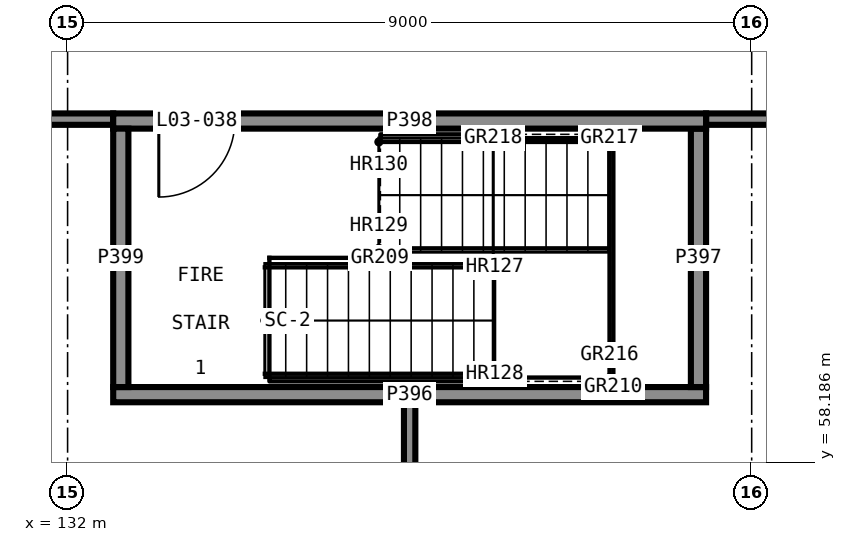
"""IFC4 building model, lengths in metres.
Left out: names, types, materials, properties, quantities, classifications, styles, units other than length and angle.
Written with IfcOpenShell. Run it as: python <this file> out.ifc"""

import sys

from ifc_helpers import new_model, si_unit, direction, frame, frame_2d, origin, place, context, subcontext, project, spatial, rectangle, extrude, element, fill, save


model = new_model("IFC4")
c1 = context("Model", 3, precision=1e-05, world=origin(), true_north=direction((0.0, 1.0)))
c2 = subcontext(c1, "Body", "Model", "MODEL_VIEW")
j1 = project(units=[si_unit("LENGTHUNIT", "METRE"), si_unit("PLANEANGLEUNIT", "RADIAN")], contexts=[c1])
p1 = place(None, origin())
s1 = spatial("IfcSite", under=j1, at=p1, CompositionType="ELEMENT")
p2 = place(p1, origin())
s2 = spatial("IfcBuilding", under=s1, at=p2, CompositionType="ELEMENT")
p3 = place(p2, frame((0.0, 0.0, 13.5)))
s3 = spatial("IfcBuildingStorey", under=s2, at=p3, CompositionType="ELEMENT", Elevation=13.5)
p4 = place(p3, frame((132.6, 59.075, 0.0), z_axis=(0.0, 0.0, 1.0), x_axis=(1.0, 0.0, 0.0)))
e1 = element("IfcWall", 1, at=p4, inside=s3, PredefinedType="SHEAR", context=c2, shape_type="SweptSolid", body=[
    extrude(rectangle(XDim=7.8, YDim=0.2, at=frame_2d((3.9, 0.0))), origin(), (0.0, 0.0, 1.0), 3.58),
])
p5 = place(p3, frame((140.3, 59.175, 0.0), z_axis=(0.0, 0.0, 1.0), x_axis=(0.0, 1.0, 0.0)))
e2 = element("IfcWall", 2, at=p5, inside=s3, PredefinedType="SHEAR", context=c2, shape_type="SweptSolid", body=[
    extrude(rectangle(XDim=3.4, YDim=0.2, at=frame_2d((1.7, 0.0))), origin(), (0.0, 0.0, 1.0), 3.58),
])
p6 = place(p3, frame((140.4, 62.675, 0.0), z_axis=(0.0, 0.0, 1.0), x_axis=(-1.0, 0.0, 0.0)))
e3 = element("IfcWall", 3, at=p6, inside=s3, PredefinedType="SHEAR", context=c2, shape_type="SweptSolid", body=[
    extrude(rectangle(XDim=7.8, YDim=0.2, at=frame_2d((3.9, 0.0))), origin(), (0.0, 0.0, 1.0), 3.58),
])
p7 = place(p6, frame((6.2, 0.0, 0.0)))
e4 = element("IfcOpeningElement", 4, at=p7, cuts=e3, PredefinedType="OPENING", context=c2, shape_type="SweptSolid", body=[
    extrude(rectangle(XDim=1.0, YDim=2.1, at=frame_2d((0.5, 1.05))), frame((0.0, 0.11, 0.0), z_axis=(0.0, -1.0, 0.0), x_axis=(1.0, 0.0, 0.0)), (0.0, 0.0, 1.0), 0.22),
])
p8 = place(p3, frame((132.7, 62.575, 0.0), z_axis=(0.0, 0.0, 1.0), x_axis=(0.0, -1.0, 0.0)))
e5 = element("IfcWall", 5, at=p8, inside=s3, PredefinedType="SHEAR", context=c2, shape_type="SweptSolid", body=[
    extrude(rectangle(XDim=3.4, YDim=0.2, at=frame_2d((1.7, 0.0))), origin(), (0.0, 0.0, 1.0), 3.58),
])
p9 = place(p3, frame((132.6, 62.7, 0.0), z_axis=(0.0, 0.0, 1.0), x_axis=(-1.0, 0.0, 0.0)))
e6 = element("IfcWall", 6, at=p9, inside=s3, PredefinedType="PARTITIONING", context=c2, shape_type="SweptSolid", body=[
    extrude(rectangle(XDim=11.825, YDim=0.15, at=frame_2d((5.913, 0.0))), origin(), (0.0, 0.0, 1.0), 3.58),
])
p10 = place(p9, frame((5.427, 0.0, 0.0)))
e7 = element("IfcOpeningElement", 7, at=p10, cuts=e6, PredefinedType="OPENING", context=c2, shape_type="SweptSolid", body=[
    extrude(rectangle(XDim=1.0, YDim=2.1, at=frame_2d((0.5, 1.05))), frame((0.0, 0.085, 0.0), z_axis=(0.0, -1.0, 0.0), x_axis=(1.0, 0.0, 0.0)), (0.0, 0.0, 1.0), 0.17),
])
p11 = place(p3, frame((143.225, 62.7, 0.0), z_axis=(0.0, 0.0, 1.0), x_axis=(-1.0, 0.0, 0.0)))
e8 = element("IfcWall", 8, at=p11, inside=s3, PredefinedType="PARTITIONING", context=c2, shape_type="SweptSolid", body=[
    extrude(rectangle(XDim=2.825, YDim=0.15, at=frame_2d((1.413, 0.0))), origin(), (0.0, 0.0, 1.0), 3.58),
])
p12 = place(p3, frame((136.5, 50.9, 0.0), z_axis=(0.0, 0.0, 1.0), x_axis=(0.0, 1.0, 0.0)))
e9 = element("IfcWall", 9, at=p12, inside=s3, PredefinedType="PARTITIONING", context=c2, shape_type="SweptSolid", body=[
    extrude(rectangle(XDim=8.075, YDim=0.15, at=frame_2d((4.038, 0.0))), origin(), (0.0, 0.0, 1.0), 3.58),
])
p13 = place(p7, origin())
e10 = element("IfcDoor", 10, at=p13, inside=s3, OperationType="SINGLE_SWING_LEFT", PredefinedType="DOOR", context=c2, shape_type="SweptSolid", body=[
    extrude(rectangle(XDim=1.0, YDim=2.1, at=frame_2d((0.5, 1.05))), frame((0.0, 0.025, 0.0), z_axis=(0.0, -1.0, 0.0), x_axis=(1.0, 0.0, 0.0)), (0.0, 0.0, 1.0), 0.05),
])
fill(e4, e10)
save(model, sys.argv[1])
